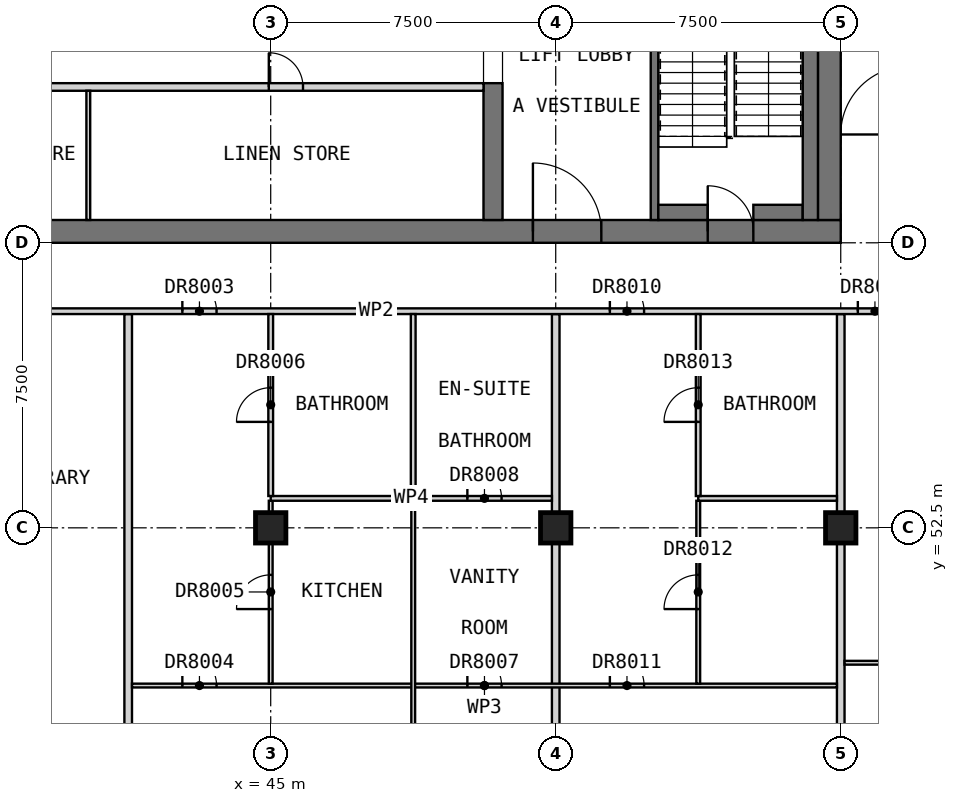
"""IFC4 building model, lengths in metres.
Left out: names, types, materials, properties, quantities, classifications, styles, units other than length and angle.
Written with IfcOpenShell. Run it as: python <this file> out.ifc"""

import sys

from ifc_helpers import new_model, si_unit, direction, frame, frame_2d, origin, origin_2d, place, context, subcontext, project, spatial, rectangle, extrude, element, fill, save


model = new_model("IFC4")
c1 = context("Model", 3, precision=1e-05, world=origin(), true_north=direction((0.0, 1.0)))
c2 = subcontext(c1, "Body", "Model", "MODEL_VIEW")
j1 = project(units=[si_unit("LENGTHUNIT", "METRE"), si_unit("PLANEANGLEUNIT", "RADIAN")], contexts=[c1])
p1 = place(None, origin())
s1 = spatial("IfcSite", under=j1, at=p1, CompositionType="ELEMENT")
p2 = place(p1, origin())
s2 = spatial("IfcBuilding", under=s1, at=p2, CompositionType="ELEMENT")
p3 = place(p2, frame((0.0, 0.0, 233.7)))
s3 = spatial("IfcBuildingStorey", under=s2, at=p3, CompositionType="ELEMENT", Elevation=233.7)
for number, where, z_axis, x_axis in (
    (1, (45.0, 52.5, 0.0), (0.0, 0.0, 1.0), (1.0, 0.0, 0.0)),
    (2, (52.5, 52.5, 0.0), (0.0, 0.0, 1.0), (1.0, 0.0, 0.0)),
    (3, (60.0, 52.5, 0.0), (0.0, 0.0, 1.0), (1.0, 0.0, 0.0)),
):
    element("IfcColumn", number, at=place(p3, frame(where, z_axis=z_axis, x_axis=x_axis)), inside=s3, PredefinedType="COLUMN", context=c2, shape_type="SweptSolid", body=[
        extrude(rectangle(XDim=0.8, YDim=0.8, at=origin_2d()), origin(), (0.0, 0.0, 1.0), 3.5),
    ])
p4 = place(p3, frame((30.0, 60.3, 0.0), z_axis=(0.0, 0.0, 1.0), x_axis=(1.0, 0.0, 0.0)))
e4 = element("IfcWall", 4, at=p4, inside=s3, PredefinedType="SHEAR", context=c2, shape_type="SweptSolid", body=[
    extrude(rectangle(XDim=30.0, YDim=0.6, at=frame_2d((15.0, 0.0))), origin(), (0.0, 0.0, 1.0), 3.5),
])
p5 = place(p4, frame((21.9, 0.0, 0.0)))
e5 = element("IfcOpeningElement", 5, at=p5, cuts=e4, PredefinedType="OPENING", context=c2, shape_type="SweptSolid", body=[
    extrude(rectangle(XDim=1.8, YDim=2.1, at=frame_2d((0.9, 1.05))), frame((0.0, 0.31, 0.0), z_axis=(0.0, -1.0, 0.0), x_axis=(1.0, 0.0, 0.0)), (0.0, 0.0, 1.0), 0.62),
])
p6 = place(p4, frame((26.5, 0.0, 0.0)))
e6 = element("IfcOpeningElement", 6, at=p6, cuts=e4, PredefinedType="OPENING", context=c2, shape_type="SweptSolid", body=[
    extrude(rectangle(XDim=1.2, YDim=2.1, at=frame_2d((0.6, 1.05))), frame((0.0, 0.31, 0.0), z_axis=(0.0, -1.0, 0.0), x_axis=(1.0, 0.0, 0.0)), (0.0, 0.0, 1.0), 0.62),
])
p7 = place(p3, frame((59.7, 60.6, 0.0), z_axis=(0.0, 0.0, 1.0), x_axis=(0.0, 1.0, 0.0)))
e7 = element("IfcWall", 7, at=p7, inside=s3, PredefinedType="SHEAR", context=c2, shape_type="SweptSolid", body=[
    extrude(rectangle(XDim=21.3, YDim=0.6, at=frame_2d((10.65, 0.0))), origin(), (0.0, 0.0, 1.0), 3.5),
])
p8 = place(p7, frame((14.9, 0.0, 0.0)))
e8 = element("IfcOpeningElement", 8, at=p8, cuts=e7, PredefinedType="OPENING", context=c2, shape_type="SweptSolid", body=[
    extrude(rectangle(XDim=1.8, YDim=2.1, at=frame_2d((0.9, 1.05))), frame((0.0, 0.31, 0.0), z_axis=(0.0, -1.0, 0.0), x_axis=(1.0, 0.0, 0.0)), (0.0, 0.0, 1.0), 0.62),
])
p9 = place(p3, frame((50.85, 60.6, 0.0), z_axis=(0.0, 0.0, 1.0), x_axis=(0.0, 1.0, 0.0)))
e9 = element("IfcWall", 9, at=p9, inside=s3, PredefinedType="SHEAR", context=c2, shape_type="SweptSolid", body=[
    extrude(rectangle(XDim=3.6, YDim=0.5, at=frame_2d((1.8, 0.0))), origin(), (0.0, 0.0, 1.0), 3.5),
])
p10 = place(p3, frame((35.0, 64.1, 0.0), z_axis=(0.0, 0.0, 1.0), x_axis=(1.0, 0.0, 0.0)))
e10 = element("IfcWall", 10, at=p10, inside=s3, PredefinedType="PARTITIONING", context=c2, shape_type="SweptSolid", body=[
    extrude(rectangle(XDim=15.6, YDim=0.2, at=frame_2d((7.8, 0.0))), origin(), (0.0, 0.0, 1.0), 3.25),
])
p11 = place(p10, frame((2.15, 0.0, 0.0)))
e11 = element("IfcOpeningElement", 11, at=p11, cuts=e10, PredefinedType="OPENING", context=c2, shape_type="SweptSolid", body=[
    extrude(rectangle(XDim=0.9, YDim=2.1, at=frame_2d((0.45, 1.05))), frame((0.0, 0.11, 0.0), z_axis=(0.0, -1.0, 0.0), x_axis=(1.0, 0.0, 0.0)), (0.0, 0.0, 1.0), 0.22),
])
p12 = place(p10, frame((9.95, 0.0, 0.0)))
e12 = element("IfcOpeningElement", 12, at=p12, cuts=e10, PredefinedType="OPENING", context=c2, shape_type="SweptSolid", body=[
    extrude(rectangle(XDim=0.9, YDim=2.1, at=frame_2d((0.45, 1.05))), frame((0.0, 0.11, 0.0), z_axis=(0.0, -1.0, 0.0), x_axis=(1.0, 0.0, 0.0)), (0.0, 0.0, 1.0), 0.22),
])
p13 = place(p3, frame((40.2, 60.6, 0.0), z_axis=(0.0, 0.0, 1.0), x_axis=(0.0, 1.0, 0.0)))
e13 = element("IfcWall", 13, at=p13, inside=s3, PredefinedType="PARTITIONING", context=c2, shape_type="SweptSolid", body=[
    extrude(rectangle(XDim=3.4, YDim=0.1, at=frame_2d((1.7, 0.0))), origin(), (0.0, 0.0, 1.0), 3.25),
])
p14 = place(p3, frame((55.1, 60.6, 0.0), z_axis=(0.0, 0.0, 1.0), x_axis=(0.0, 1.0, 0.0)))
e14 = element("IfcWall", 14, at=p14, inside=s3, PredefinedType="SOLIDWALL", context=c2, shape_type="SweptSolid", body=[
    extrude(rectangle(XDim=8.0, YDim=0.2, at=frame_2d((4.0, 0.0))), origin(), (0.0, 0.0, 1.0), 3.25),
])
for number, where, z_axis, x_axis in (
    (15, (55.2, 60.8, 0.0), (0.0, 0.0, 1.0), (1.0, 0.0, 0.0)),
    (16, (57.7, 60.8, 0.0), (0.0, 0.0, 1.0), (1.0, 0.0, 0.0)),
):
    element("IfcWall", number, at=place(p3, frame(where, z_axis=z_axis, x_axis=x_axis)), inside=s3, PredefinedType="SOLIDWALL", context=c2, shape_type="SweptSolid", body=[
        extrude(rectangle(XDim=1.3, YDim=0.4, at=frame_2d((0.65, 0.0))), origin(), (0.0, 0.0, 1.0), 3.25),
    ])
p15 = place(p3, frame((59.2, 60.6, 0.0), z_axis=(0.0, 0.0, 1.0), x_axis=(0.0, 1.0, 0.0)))
e17 = element("IfcWall", 17, at=p15, inside=s3, PredefinedType="SOLIDWALL", context=c2, shape_type="SweptSolid", body=[
    extrude(rectangle(XDim=7.9, YDim=0.4, at=frame_2d((3.95, 0.0))), origin(), (0.0, 0.0, 1.0), 3.25),
])
p16 = place(p3, frame((41.25, 42.06, 0.0), z_axis=(0.0, 0.0, 1.0), x_axis=(0.0, 1.0, 0.0)))
e18 = element("IfcWall", 18, at=p16, inside=s3, PredefinedType="PARTITIONING", context=c2, shape_type="SweptSolid", body=[
    extrude(rectangle(XDim=16.065, YDim=0.2, at=frame_2d((8.032, 0.0))), origin(), (0.0, 0.0, 1.0), 3.25),
])
for number, where, z_axis, x_axis in (
    (19, (52.5, 41.25, 0.0), (0.0, 0.0, 1.0), (0.0, 1.0, 0.0)),
    (20, (60.0, 41.25, 0.0), (0.0, 0.0, 1.0), (0.0, 1.0, 0.0)),
):
    element("IfcWall", number, at=place(p3, frame(where, z_axis=z_axis, x_axis=x_axis)), inside=s3, PredefinedType="PARTITIONING", context=c2, shape_type="SweptSolid", body=[
        extrude(rectangle(XDim=16.875, YDim=0.2, at=frame_2d((8.438, 0.0))), origin(), (0.0, 0.0, 1.0), 3.25),
    ])
p17 = place(p3, frame((33.75, 58.2, 0.0), z_axis=(0.0, 0.0, 1.0), x_axis=(1.0, 0.0, 0.0)))
e21 = element("IfcWall", 21, at=p17, inside=s3, PredefinedType="PARTITIONING", context=c2, shape_type="SweptSolid", body=[
    extrude(rectangle(XDim=28.05, YDim=0.15, at=frame_2d((14.025, 0.0))), origin(), (0.0, 0.0, 1.0), 3.25),
])
p18 = place(p17, frame((3.25, 0.0, 0.0)))
e22 = element("IfcOpeningElement", 22, at=p18, cuts=e21, PredefinedType="OPENING", context=c2, shape_type="SweptSolid", body=[
    extrude(rectangle(XDim=1.0, YDim=2.1, at=frame_2d((0.5, 1.05))), frame((0.0, 0.085, 0.0), z_axis=(0.0, -1.0, 0.0), x_axis=(1.0, 0.0, 0.0)), (0.0, 0.0, 1.0), 0.17),
])
p19 = place(p17, frame((8.925, 0.0, 0.0)))
e23 = element("IfcOpeningElement", 23, at=p19, cuts=e21, PredefinedType="OPENING", context=c2, shape_type="SweptSolid", body=[
    extrude(rectangle(XDim=0.9, YDim=2.1, at=frame_2d((0.45, 1.05))), frame((0.0, 0.085, 0.0), z_axis=(0.0, -1.0, 0.0), x_axis=(1.0, 0.0, 0.0)), (0.0, 0.0, 1.0), 0.17),
])
p20 = place(p17, frame((20.175, 0.0, 0.0)))
e24 = element("IfcOpeningElement", 24, at=p20, cuts=e21, PredefinedType="OPENING", context=c2, shape_type="SweptSolid", body=[
    extrude(rectangle(XDim=0.9, YDim=2.1, at=frame_2d((0.45, 1.05))), frame((0.0, 0.085, 0.0), z_axis=(0.0, -1.0, 0.0), x_axis=(1.0, 0.0, 0.0)), (0.0, 0.0, 1.0), 0.17),
])
p21 = place(p17, frame((26.7, 0.0, 0.0)))
e25 = element("IfcOpeningElement", 25, at=p21, cuts=e21, PredefinedType="OPENING", context=c2, shape_type="SweptSolid", body=[
    extrude(rectangle(XDim=0.9, YDim=2.1, at=frame_2d((0.45, 1.05))), frame((0.0, 0.085, 0.0), z_axis=(0.0, -1.0, 0.0), x_axis=(1.0, 0.0, 0.0)), (0.0, 0.0, 1.0), 0.17),
])
p22 = place(p3, frame((41.35, 48.35, 0.0), z_axis=(0.0, 0.0, 1.0), x_axis=(1.0, 0.0, 0.0)))
e26 = element("IfcWall", 26, at=p22, inside=s3, PredefinedType="PARTITIONING", context=c2, shape_type="SweptSolid", body=[
    extrude(rectangle(XDim=18.55, YDim=0.1, at=frame_2d((9.275, 0.0))), origin(), (0.0, 0.0, 1.0), 3.25),
])
p23 = place(p22, frame((1.325, 0.0, 0.0)))
e27 = element("IfcOpeningElement", 27, at=p23, cuts=e26, PredefinedType="OPENING", context=c2, shape_type="SweptSolid", body=[
    extrude(rectangle(XDim=0.9, YDim=2.1, at=frame_2d((0.45, 1.05))), frame((0.0, 0.06, 0.0), z_axis=(0.0, -1.0, 0.0), x_axis=(1.0, 0.0, 0.0)), (0.0, 0.0, 1.0), 0.12),
])
p24 = place(p22, frame((8.825, 0.0, 0.0)))
e28 = element("IfcOpeningElement", 28, at=p24, cuts=e26, PredefinedType="OPENING", context=c2, shape_type="SweptSolid", body=[
    extrude(rectangle(XDim=0.9, YDim=2.1, at=frame_2d((0.45, 1.05))), frame((0.0, 0.06, 0.0), z_axis=(0.0, -1.0, 0.0), x_axis=(1.0, 0.0, 0.0)), (0.0, 0.0, 1.0), 0.12),
])
p25 = place(p22, frame((12.575, 0.0, 0.0)))
e29 = element("IfcOpeningElement", 29, at=p25, cuts=e26, PredefinedType="OPENING", context=c2, shape_type="SweptSolid", body=[
    extrude(rectangle(XDim=0.9, YDim=2.1, at=frame_2d((0.45, 1.05))), frame((0.0, 0.06, 0.0), z_axis=(0.0, -1.0, 0.0), x_axis=(1.0, 0.0, 0.0)), (0.0, 0.0, 1.0), 0.12),
])
p26 = place(p3, frame((60.1, 48.95, 0.0), z_axis=(0.0, 0.0, 1.0), x_axis=(1.0, 0.0, 0.0)))
e30 = element("IfcWall", 30, at=p26, inside=s3, PredefinedType="PARTITIONING", context=c2, shape_type="SweptSolid", body=[
    extrude(rectangle(XDim=17.84, YDim=0.1, at=frame_2d((8.92, 0.0))), origin(), (0.0, 0.0, 1.0), 3.25),
])
p27 = place(p26, frame((1.325, 0.0, 0.0)))
e31 = element("IfcOpeningElement", 31, at=p27, cuts=e30, PredefinedType="OPENING", context=c2, shape_type="SweptSolid", body=[
    extrude(rectangle(XDim=0.9, YDim=2.1, at=frame_2d((0.45, 1.05))), frame((0.0, 0.06, 0.0), z_axis=(0.0, -1.0, 0.0), x_axis=(1.0, 0.0, 0.0)), (0.0, 0.0, 1.0), 0.12),
])
p28 = place(p26, frame((8.825, 0.0, 0.0)))
e32 = element("IfcOpeningElement", 32, at=p28, cuts=e30, PredefinedType="OPENING", context=c2, shape_type="SweptSolid", body=[
    extrude(rectangle(XDim=0.9, YDim=2.1, at=frame_2d((0.45, 1.05))), frame((0.0, 0.06, 0.0), z_axis=(0.0, -1.0, 0.0), x_axis=(1.0, 0.0, 0.0)), (0.0, 0.0, 1.0), 0.12),
])
p29 = place(p26, frame((13.725, 0.0, 0.0)))
e33 = element("IfcOpeningElement", 33, at=p29, cuts=e30, PredefinedType="OPENING", context=c2, shape_type="SweptSolid", body=[
    extrude(rectangle(XDim=0.9, YDim=2.1, at=frame_2d((0.45, 1.05))), frame((0.0, 0.06, 0.0), z_axis=(0.0, -1.0, 0.0), x_axis=(1.0, 0.0, 0.0)), (0.0, 0.0, 1.0), 0.12),
])
p30 = place(p26, frame((16.325, 0.0, 0.0)))
e34 = element("IfcOpeningElement", 34, at=p30, cuts=e30, PredefinedType="OPENING", context=c2, shape_type="SweptSolid", body=[
    extrude(rectangle(XDim=0.9, YDim=2.1, at=frame_2d((0.45, 1.05))), frame((0.0, 0.06, 0.0), z_axis=(0.0, -1.0, 0.0), x_axis=(1.0, 0.0, 0.0)), (0.0, 0.0, 1.0), 0.12),
])
p31 = place(p3, frame((45.0, 48.4, 0.0), z_axis=(0.0, 0.0, 1.0), x_axis=(0.0, 1.0, 0.0)))
e35 = element("IfcWall", 35, at=p31, inside=s3, PredefinedType="PARTITIONING", context=c2, shape_type="SweptSolid", body=[
    extrude(rectangle(XDim=4.812, YDim=0.1, at=frame_2d((2.406, 0.0))), origin(), (0.0, 0.0, 1.0), 3.25),
])
p32 = place(p31, frame((1.962, 0.0, 0.0)))
e36 = element("IfcOpeningElement", 36, at=p32, cuts=e35, PredefinedType="OPENING", context=c2, shape_type="SweptSolid", body=[
    extrude(rectangle(XDim=0.9, YDim=2.1, at=frame_2d((0.45, 1.05))), frame((0.0, 0.06, 0.0), z_axis=(0.0, -1.0, 0.0), x_axis=(1.0, 0.0, 0.0)), (0.0, 0.0, 1.0), 0.12),
])
p33 = place(p3, frame((48.75, 42.06, 0.0), z_axis=(0.0, 0.0, 1.0), x_axis=(0.0, 1.0, 0.0)))
e37 = element("IfcWall", 37, at=p33, inside=s3, PredefinedType="PARTITIONING", context=c2, shape_type="SweptSolid", body=[
    extrude(rectangle(XDim=11.152, YDim=0.1, at=frame_2d((5.576, 0.0))), origin(), (0.0, 0.0, 1.0), 3.25),
])
p34 = place(p33, frame((2.29, 0.0, 0.0)))
e38 = element("IfcOpeningElement", 38, at=p34, cuts=e37, PredefinedType="OPENING", context=c2, shape_type="SweptSolid", body=[
    extrude(rectangle(XDim=0.9, YDim=2.1, at=frame_2d((0.45, 1.05))), frame((0.0, 0.06, 0.0), z_axis=(0.0, -1.0, 0.0), x_axis=(1.0, 0.0, 0.0)), (0.0, 0.0, 1.0), 0.12),
])
p35 = place(p3, frame((56.25, 48.4, 0.0), z_axis=(0.0, 0.0, 1.0), x_axis=(0.0, 1.0, 0.0)))
e39 = element("IfcWall", 39, at=p35, inside=s3, PredefinedType="PARTITIONING", context=c2, shape_type="SweptSolid", body=[
    extrude(rectangle(XDim=4.812, YDim=0.1, at=frame_2d((2.406, 0.0))), origin(), (0.0, 0.0, 1.0), 3.25),
])
p36 = place(p35, frame((1.962, 0.0, 0.0)))
e40 = element("IfcOpeningElement", 40, at=p36, cuts=e39, PredefinedType="OPENING", context=c2, shape_type="SweptSolid", body=[
    extrude(rectangle(XDim=0.9, YDim=2.1, at=frame_2d((0.45, 1.05))), frame((0.0, 0.06, 0.0), z_axis=(0.0, -1.0, 0.0), x_axis=(1.0, 0.0, 0.0)), (0.0, 0.0, 1.0), 0.12),
])
p37 = place(p3, frame((45.0, 53.275, 0.0), z_axis=(0.0, 0.0, 1.0), x_axis=(1.0, 0.0, 0.0)))
e41 = element("IfcWall", 41, at=p37, inside=s3, PredefinedType="PARTITIONING", context=c2, shape_type="SweptSolid", body=[
    extrude(rectangle(XDim=7.4, YDim=0.125, at=frame_2d((3.7, 0.0))), origin(), (0.0, 0.0, 1.0), 3.25),
])
p38 = place(p37, frame((5.175, 0.0, 0.0)))
e42 = element("IfcOpeningElement", 42, at=p38, cuts=e41, PredefinedType="OPENING", context=c2, shape_type="SweptSolid", body=[
    extrude(rectangle(XDim=0.9, YDim=2.1, at=frame_2d((0.45, 1.05))), frame((0.0, 0.073, 0.0), z_axis=(0.0, -1.0, 0.0), x_axis=(1.0, 0.0, 0.0)), (0.0, 0.0, 1.0), 0.145),
])
p39 = place(p3, frame((56.25, 53.275, 0.0), z_axis=(0.0, 0.0, 1.0), x_axis=(1.0, 0.0, 0.0)))
e43 = element("IfcWall", 43, at=p39, inside=s3, PredefinedType="PARTITIONING", context=c2, shape_type="SweptSolid", body=[
    extrude(rectangle(XDim=3.65, YDim=0.125, at=frame_2d((1.825, 0.0))), origin(), (0.0, 0.0, 1.0), 3.25),
])
p40 = place(p3, frame((45.0, 53.337, 0.0), z_axis=(0.0, 0.0, 1.0), x_axis=(0.0, 1.0, 0.0)))
e44 = element("IfcWall", 44, at=p40, inside=s3, PredefinedType="PARTITIONING", context=c2, shape_type="SweptSolid", body=[
    extrude(rectangle(XDim=4.788, YDim=0.125, at=frame_2d((2.394, 0.0))), origin(), (0.0, 0.0, 1.0), 3.25),
])
p41 = place(p40, frame((1.95, 0.0, 0.0)))
e45 = element("IfcOpeningElement", 45, at=p41, cuts=e44, PredefinedType="OPENING", context=c2, shape_type="SweptSolid", body=[
    extrude(rectangle(XDim=0.9, YDim=2.1, at=frame_2d((0.45, 1.05))), frame((0.0, 0.073, 0.0), z_axis=(0.0, -1.0, 0.0), x_axis=(1.0, 0.0, 0.0)), (0.0, 0.0, 1.0), 0.145),
])
p42 = place(p3, frame((48.75, 53.337, 0.0), z_axis=(0.0, 0.0, 1.0), x_axis=(0.0, 1.0, 0.0)))
e46 = element("IfcWall", 46, at=p42, inside=s3, PredefinedType="PARTITIONING", context=c2, shape_type="SweptSolid", body=[
    extrude(rectangle(XDim=4.788, YDim=0.125, at=frame_2d((2.394, 0.0))), origin(), (0.0, 0.0, 1.0), 3.25),
])
p43 = place(p3, frame((56.25, 53.337, 0.0), z_axis=(0.0, 0.0, 1.0), x_axis=(0.0, 1.0, 0.0)))
e47 = element("IfcWall", 47, at=p43, inside=s3, PredefinedType="PARTITIONING", context=c2, shape_type="SweptSolid", body=[
    extrude(rectangle(XDim=4.788, YDim=0.125, at=frame_2d((2.394, 0.0))), origin(), (0.0, 0.0, 1.0), 3.25),
])
p44 = place(p43, frame((1.95, 0.0, 0.0)))
e48 = element("IfcOpeningElement", 48, at=p44, cuts=e47, PredefinedType="OPENING", context=c2, shape_type="SweptSolid", body=[
    extrude(rectangle(XDim=0.9, YDim=2.1, at=frame_2d((0.45, 1.05))), frame((0.0, 0.073, 0.0), z_axis=(0.0, -1.0, 0.0), x_axis=(1.0, 0.0, 0.0)), (0.0, 0.0, 1.0), 0.145),
])
p45 = place(p12, origin())
e49 = element("IfcDoor", 49, at=p45, inside=s3, OperationType="SINGLE_SWING_LEFT", PredefinedType="DOOR", context=c2, shape_type="SweptSolid", body=[
    extrude(rectangle(XDim=0.9, YDim=2.1, at=frame_2d((0.45, 1.05))), frame((0.0, 0.025, 0.0), z_axis=(0.0, -1.0, 0.0), x_axis=(1.0, 0.0, 0.0)), (0.0, 0.0, 1.0), 0.05),
])
fill(e12, e49)
p46 = place(p5, origin())
e50 = element("IfcDoor", 50, at=p46, inside=s3, OperationType="DOUBLE_DOOR_SINGLE_SWING", PredefinedType="DOOR", context=c2, shape_type="SweptSolid", body=[
    extrude(rectangle(XDim=1.8, YDim=2.1, at=frame_2d((0.9, 1.05))), frame((0.0, 0.025, 0.0), z_axis=(0.0, -1.0, 0.0), x_axis=(1.0, 0.0, 0.0)), (0.0, 0.0, 1.0), 0.05),
])
fill(e5, e50)
p47 = place(p6, origin())
e51 = element("IfcDoor", 51, at=p47, inside=s3, OperationType="SINGLE_SWING_LEFT", PredefinedType="DOOR", context=c2, shape_type="SweptSolid", body=[
    extrude(rectangle(XDim=1.2, YDim=2.1, at=frame_2d((0.6, 1.05))), frame((0.0, 0.025, 0.0), z_axis=(0.0, -1.0, 0.0), x_axis=(1.0, 0.0, 0.0)), (0.0, 0.0, 1.0), 0.05),
])
fill(e6, e51)
p48 = place(p19, origin())
e52 = element("IfcDoor", 52, at=p48, inside=s3, OperationType="SINGLE_SWING_RIGHT", PredefinedType="DOOR", context=c2, shape_type="SweptSolid", body=[
    extrude(rectangle(XDim=0.9, YDim=2.1, at=frame_2d((0.45, 1.05))), frame((0.0, 0.025, 0.0), z_axis=(0.0, -1.0, 0.0), x_axis=(1.0, 0.0, 0.0)), (0.0, 0.0, 1.0), 0.05),
])
fill(e23, e52)
p49 = place(p23, origin())
e53 = element("IfcDoor", 53, at=p49, inside=s3, OperationType="SINGLE_SWING_LEFT", PredefinedType="DOOR", context=c2, shape_type="SweptSolid", body=[
    extrude(rectangle(XDim=0.9, YDim=2.1, at=frame_2d((0.45, 1.05))), frame((0.0, 0.025, 0.0), z_axis=(0.0, -1.0, 0.0), x_axis=(1.0, 0.0, 0.0)), (0.0, 0.0, 1.0), 0.05),
])
fill(e27, e53)
p50 = place(p32, origin())
e54 = element("IfcDoor", 54, at=p50, inside=s3, OperationType="SINGLE_SWING_LEFT", PredefinedType="DOOR", context=c2, shape_type="SweptSolid", body=[
    extrude(rectangle(XDim=0.9, YDim=2.1, at=frame_2d((0.45, 1.05))), frame((0.0, 0.025, 0.0), z_axis=(0.0, -1.0, 0.0), x_axis=(1.0, 0.0, 0.0)), (0.0, 0.0, 1.0), 0.05),
])
fill(e36, e54)
p51 = place(p41, origin())
e55 = element("IfcDoor", 55, at=p51, inside=s3, OperationType="SINGLE_SWING_RIGHT", PredefinedType="DOOR", context=c2, shape_type="SweptSolid", body=[
    extrude(rectangle(XDim=0.9, YDim=2.1, at=frame_2d((0.45, 1.05))), frame((0.0, 0.025, 0.0), z_axis=(0.0, -1.0, 0.0), x_axis=(1.0, 0.0, 0.0)), (0.0, 0.0, 1.0), 0.05),
])
fill(e45, e55)
p52 = place(p24, origin())
e56 = element("IfcDoor", 56, at=p52, inside=s3, OperationType="SINGLE_SWING_LEFT", PredefinedType="DOOR", context=c2, shape_type="SweptSolid", body=[
    extrude(rectangle(XDim=0.9, YDim=2.1, at=frame_2d((0.45, 1.05))), frame((0.0, 0.025, 0.0), z_axis=(0.0, -1.0, 0.0), x_axis=(1.0, 0.0, 0.0)), (0.0, 0.0, 1.0), 0.05),
])
fill(e28, e56)
p53 = place(p38, origin())
e57 = element("IfcDoor", 57, at=p53, inside=s3, OperationType="SINGLE_SWING_LEFT", PredefinedType="DOOR", context=c2, shape_type="SweptSolid", body=[
    extrude(rectangle(XDim=0.9, YDim=2.1, at=frame_2d((0.45, 1.05))), frame((0.0, 0.025, 0.0), z_axis=(0.0, -1.0, 0.0), x_axis=(1.0, 0.0, 0.0)), (0.0, 0.0, 1.0), 0.05),
])
fill(e42, e57)
p54 = place(p20, origin())
e58 = element("IfcDoor", 58, at=p54, inside=s3, OperationType="SINGLE_SWING_RIGHT", PredefinedType="DOOR", context=c2, shape_type="SweptSolid", body=[
    extrude(rectangle(XDim=0.9, YDim=2.1, at=frame_2d((0.45, 1.05))), frame((0.0, 0.025, 0.0), z_axis=(0.0, -1.0, 0.0), x_axis=(1.0, 0.0, 0.0)), (0.0, 0.0, 1.0), 0.05),
])
fill(e24, e58)
p55 = place(p25, origin())
e59 = element("IfcDoor", 59, at=p55, inside=s3, OperationType="SINGLE_SWING_LEFT", PredefinedType="DOOR", context=c2, shape_type="SweptSolid", body=[
    extrude(rectangle(XDim=0.9, YDim=2.1, at=frame_2d((0.45, 1.05))), frame((0.0, 0.025, 0.0), z_axis=(0.0, -1.0, 0.0), x_axis=(1.0, 0.0, 0.0)), (0.0, 0.0, 1.0), 0.05),
])
fill(e29, e59)
p56 = place(p36, origin())
e60 = element("IfcDoor", 60, at=p56, inside=s3, OperationType="SINGLE_SWING_LEFT", PredefinedType="DOOR", context=c2, shape_type="SweptSolid", body=[
    extrude(rectangle(XDim=0.9, YDim=2.1, at=frame_2d((0.45, 1.05))), frame((0.0, 0.025, 0.0), z_axis=(0.0, -1.0, 0.0), x_axis=(1.0, 0.0, 0.0)), (0.0, 0.0, 1.0), 0.05),
])
fill(e40, e60)
p57 = place(p44, origin())
e61 = element("IfcDoor", 61, at=p57, inside=s3, OperationType="SINGLE_SWING_RIGHT", PredefinedType="DOOR", context=c2, shape_type="SweptSolid", body=[
    extrude(rectangle(XDim=0.9, YDim=2.1, at=frame_2d((0.45, 1.05))), frame((0.0, 0.025, 0.0), z_axis=(0.0, -1.0, 0.0), x_axis=(1.0, 0.0, 0.0)), (0.0, 0.0, 1.0), 0.05),
])
fill(e48, e61)
p58 = place(p21, origin())
e62 = element("IfcDoor", 62, at=p58, inside=s3, OperationType="SINGLE_SWING_RIGHT", PredefinedType="DOOR", context=c2, shape_type="SweptSolid", body=[
    extrude(rectangle(XDim=0.9, YDim=2.1, at=frame_2d((0.45, 1.05))), frame((0.0, 0.025, 0.0), z_axis=(0.0, -1.0, 0.0), x_axis=(1.0, 0.0, 0.0)), (0.0, 0.0, 1.0), 0.05),
])
fill(e25, e62)
save(model, sys.argv[1])
